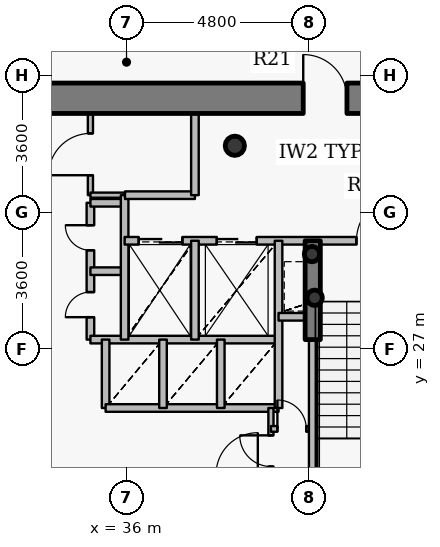
"""IFC4 building model, lengths in metres.
Left out: names, types, materials, properties, quantities, classifications, styles, units other than length and angle.
Written with IfcOpenShell. Run it as: python <this file> out.ifc"""

import sys

from ifc_helpers import new_model, si_unit, direction, frame, frame_2d, origin, origin_2d, place, context, subcontext, project, spatial, rectangle, hollow_circle, extrude, source, transform, mapped, element, fill, save


model = new_model("IFC4")
c1 = context("Model", 3, precision=1e-05, world=origin(), true_north=direction((0.0, 1.0)))
c2 = subcontext(c1, "Body", "Model", "MODEL_VIEW")
j1 = project(units=[si_unit("LENGTHUNIT", "METRE"), si_unit("PLANEANGLEUNIT", "RADIAN")], contexts=[c1])
p1 = place(None, origin())
s1 = spatial("IfcSite", under=j1, at=p1, CompositionType="ELEMENT")
p2 = place(p1, origin())
s2 = spatial("IfcBuilding", under=s1, at=p2, CompositionType="ELEMENT")
p3 = place(p2, frame((0.0, 0.0, 201.15)))
s3 = spatial("IfcBuildingStorey", under=s2, at=p3, CompositionType="ELEMENT", Elevation=201.15)
p4 = place(p3, frame((38.85, 32.35, 0.0), z_axis=(0.0, 0.0, 1.0), x_axis=(1.0, 0.0, 0.0)))
e1 = element("IfcColumn", 1, at=p4, inside=s3, PredefinedType="COLUMN", context=c2, shape_type="SweptSolid", body=[
    extrude(hollow_circle(Radius=0.254, WallThickness=0.02, at=origin_2d()), origin(), (0.0, 0.0, 1.0), 3.75),
])
for number, where, z_axis, x_axis in (
    (2, (40.95, 28.35, 0.0), (0.0, 0.0, 1.0), (1.0, 0.0, 0.0)),
    (3, (40.88, 29.5, 0.0), (0.0, 0.0, 1.0), (1.0, 0.0, 0.0)),
):
    element("IfcColumn", number, at=place(p3, frame(where, z_axis=z_axis, x_axis=x_axis)), inside=s3, PredefinedType="COLUMN", context=c2, shape_type="SweptSolid", body=[
        extrude(hollow_circle(Radius=0.203, WallThickness=0.016, at=origin_2d()), origin(), (0.0, 0.0, 1.0), 3.75),
    ])
p5 = place(p3, frame((27.2, 33.6, 0.0), z_axis=(0.0, 0.0, 1.0), x_axis=(1.0, 0.0, 0.0)))
e4 = element("IfcWall", 4, at=p5, inside=s3, PredefinedType="SHEAR", context=c2, shape_type="SweptSolid", body=[
    extrude(rectangle(XDim=17.6, YDim=0.8, at=frame_2d((8.8, 0.0))), origin(), (0.0, 0.0, 1.0), 2.9),
])
p6 = place(p5, frame((13.45, 0.0, 0.0)))
e5 = element("IfcOpeningElement", 5, at=p6, cuts=e4, PredefinedType="OPENING", context=c2, shape_type="SweptSolid", body=[
    extrude(rectangle(XDim=1.15, YDim=2.15, at=origin_2d()), frame((0.575, 0.41, 1.075), z_axis=(0.0, -1.0, 0.0), x_axis=(1.0, 0.0, 0.0)), (0.0, 0.0, 1.0), 0.82),
])
p7 = place(p3, frame((40.9, 27.25, 0.0), z_axis=(0.0, 0.0, 1.0), x_axis=(0.0, 1.0, 0.0)))
e6 = element("IfcWall", 6, at=p7, inside=s3, PredefinedType="SHEAR", context=c2, shape_type="SweptSolid", body=[
    extrude(rectangle(XDim=2.6, YDim=0.4, at=frame_2d((1.3, 0.0))), origin(), (0.0, 0.0, 1.0), 3.05),
])
p8 = place(p3, frame((35.05, 27.25, 0.0), z_axis=(0.0, 0.0, 1.0), x_axis=(0.0, 1.0, 0.0)))
e7 = element("IfcWall", 7, at=p8, inside=s3, PredefinedType="PARTITIONING", context=c2, shape_type="SweptSolid", body=[
    extrude(rectangle(XDim=3.6, YDim=0.2, at=frame_2d((1.8, 0.0))), origin(), (0.0, 0.0, 1.0), 3.45),
])
p9 = place(p8, frame((0.59, 0.0, 0.0)))
e8 = element("IfcOpeningElement", 8, at=p9, cuts=e7, PredefinedType="OPENING", context=c2, shape_type="SweptSolid", body=[
    extrude(rectangle(XDim=0.66, YDim=2.05, at=origin_2d()), frame((0.33, 0.11, 1.025), z_axis=(0.0, -1.0, 0.0), x_axis=(1.0, 0.0, 0.0)), (0.0, 0.0, 1.0), 0.22),
])
p10 = place(p8, frame((2.35, 0.0, 0.0)))
e9 = element("IfcOpeningElement", 9, at=p10, cuts=e7, PredefinedType="OPENING", context=c2, shape_type="SweptSolid", body=[
    extrude(rectangle(XDim=0.66, YDim=2.05, at=origin_2d()), frame((0.33, 0.11, 1.025), z_axis=(0.0, -1.0, 0.0), x_axis=(1.0, 0.0, 0.0)), (0.0, 0.0, 1.0), 0.22),
])
p11 = place(p3, frame((35.05, 27.25, 0.0), z_axis=(0.0, 0.0, 1.0), x_axis=(1.0, 0.0, 0.0)))
e10 = element("IfcWall", 10, at=p11, inside=s3, PredefinedType="PARTITIONING", context=c2, shape_type="SweptSolid", body=[
    extrude(rectangle(XDim=4.95, YDim=0.2, at=frame_2d((2.475, 0.0))), origin(), (0.0, 0.0, 1.0), 3.035),
])
for number, where, z_axis, x_axis in (
    (11, (35.05, 29.05, 0.0), (0.0, 0.0, 1.0), (1.0, 0.0, 0.0)),
    (12, (35.05, 30.85, 0.0), (0.0, 0.0, 1.0), (1.0, 0.0, 0.0)),
):
    element("IfcWall", number, at=place(p3, frame(where, z_axis=z_axis, x_axis=x_axis)), inside=s3, PredefinedType="PARTITIONING", context=c2, shape_type="SweptSolid", body=[
        extrude(rectangle(XDim=0.9, YDim=0.2, at=frame_2d((0.45, 0.0))), origin(), (0.0, 0.0, 1.0), 3.45),
    ])
p12 = place(p3, frame((35.05, 31.05, 0.0), z_axis=(0.0, 0.0, 1.0), x_axis=(0.0, 1.0, 0.0)))
e13 = element("IfcWall", 13, at=p12, inside=s3, PredefinedType="PARTITIONING", context=c2, shape_type="SweptSolid", body=[
    extrude(rectangle(XDim=2.15, YDim=0.135, at=frame_2d((1.075, 0.0))), origin(), (0.0, 0.0, 1.0), 3.035),
])
p13 = place(p12, frame((0.525, 0.0, 0.0)))
e14 = element("IfcOpeningElement", 14, at=p13, cuts=e13, PredefinedType="OPENING", context=c2, shape_type="SweptSolid", body=[
    extrude(rectangle(XDim=1.1, YDim=2.15, at=origin_2d()), frame((0.55, 0.078, 1.075), z_axis=(0.0, -1.0, 0.0), x_axis=(1.0, 0.0, 0.0)), (0.0, 0.0, 1.0), 0.155),
])
p14 = place(p3, frame((35.05, 31.05, 0.0), z_axis=(0.0, 0.0, 1.0), x_axis=(1.0, 0.0, 0.0)))
e15 = element("IfcWall", 15, at=p14, inside=s3, PredefinedType="PARTITIONING", context=c2, shape_type="SweptSolid", body=[
    extrude(rectangle(XDim=0.9, YDim=0.135, at=frame_2d((0.45, 0.0))), origin(), (0.0, 0.0, 1.0), 3.45),
])
p15 = place(p3, frame((35.45, 25.45, 0.0), z_axis=(0.0, 0.0, 1.0), x_axis=(0.0, 1.0, 0.0)))
e16 = element("IfcWall", 16, at=p15, inside=s3, PredefinedType="PARTITIONING", context=c2, shape_type="SweptSolid", body=[
    extrude(rectangle(XDim=1.8, YDim=0.2, at=frame_2d((0.9, 0.0))), origin(), (0.0, 0.0, 1.0), 3.45),
])
p16 = place(p3, frame((35.45, 25.45, 0.0), z_axis=(0.0, 0.0, 1.0), x_axis=(1.0, 0.0, 0.0)))
e17 = element("IfcWall", 17, at=p16, inside=s3, PredefinedType="PARTITIONING", context=c2, shape_type="SweptSolid", body=[
    extrude(rectangle(XDim=4.55, YDim=0.2, at=frame_2d((2.275, 0.0))), origin(), (0.0, 0.0, 1.0), 3.035),
])
p17 = place(p3, frame((35.95, 27.25, 0.0), z_axis=(0.0, 0.0, 1.0), x_axis=(0.0, 1.0, 0.0)))
e18 = element("IfcWall", 18, at=p17, inside=s3, PredefinedType="PARTITIONING", context=c2, shape_type="SweptSolid", body=[
    extrude(rectangle(XDim=3.8, YDim=0.2, at=frame_2d((1.9, 0.0))), origin(), (0.0, 0.0, 1.0), 3.45),
])
p18 = place(p3, frame((35.95, 29.85, 0.0), z_axis=(0.0, 0.0, 1.0), x_axis=(1.0, 0.0, 0.0)))
e19 = element("IfcWall", 19, at=p18, inside=s3, PredefinedType="PARTITIONING", context=c2, shape_type="SweptSolid", body=[
    extrude(rectangle(XDim=8.49, YDim=0.2, at=frame_2d((4.245, 0.0))), origin(), (0.0, 0.0, 1.0), 3.035),
])
p19 = place(p18, frame((6.1, 0.0, 0.0)))
e20 = element("IfcOpeningElement", 20, at=p19, cuts=e19, PredefinedType="OPENING", context=c2, shape_type="SweptSolid", body=[
    extrude(rectangle(XDim=1.2, YDim=2.15, at=origin_2d()), frame((0.6, 0.11, 1.075), z_axis=(0.0, -1.0, 0.0), x_axis=(1.0, 0.0, 0.0)), (0.0, 0.0, 1.0), 0.22),
])
p20 = place(p18, frame((0.37, 0.0, 0.0)))
e21 = element("IfcOpeningElement", 21, at=p20, cuts=e19, PredefinedType="OPENING", context=c2, shape_type="SweptSolid", body=[
    extrude(rectangle(XDim=1.15, YDim=2.15, at=origin_2d()), frame((0.575, 0.11, 1.075), z_axis=(0.0, -1.0, 0.0), x_axis=(1.0, 0.0, 0.0)), (0.0, 0.0, 1.0), 0.22),
])
p21 = place(p18, frame((2.425, 0.0, 0.0)))
e22 = element("IfcOpeningElement", 22, at=p21, cuts=e19, PredefinedType="OPENING", context=c2, shape_type="SweptSolid", body=[
    extrude(rectangle(XDim=1.05, YDim=2.15, at=origin_2d()), frame((0.525, 0.11, 1.075), z_axis=(0.0, -1.0, 0.0), x_axis=(1.0, 0.0, 0.0)), (0.0, 0.0, 1.0), 0.22),
])
p22 = place(p3, frame((35.96, 31.05, 0.0), z_axis=(0.0, 0.0, 1.0), x_axis=(1.0, 0.0, 0.0)))
e23 = element("IfcWall", 23, at=p22, inside=s3, PredefinedType="PARTITIONING", context=c2, shape_type="SweptSolid", body=[
    extrude(rectangle(XDim=1.84, YDim=0.2, at=frame_2d((0.92, 0.0))), origin(), (0.0, 0.0, 1.0), 3.45),
])
p23 = place(p3, frame((36.96, 25.45, 0.0), z_axis=(0.0, 0.0, 1.0), x_axis=(0.0, 1.0, 0.0)))
e24 = element("IfcWall", 24, at=p23, inside=s3, PredefinedType="PARTITIONING", context=c2, shape_type="SweptSolid", body=[
    extrude(rectangle(XDim=1.8, YDim=0.2, at=frame_2d((0.9, 0.0))), origin(), (0.0, 0.0, 1.0), 3.45),
])
p24 = place(p3, frame((37.8, 27.25, 0.0), z_axis=(0.0, 0.0, 1.0), x_axis=(0.0, 1.0, 0.0)))
e25 = element("IfcWall", 25, at=p24, inside=s3, PredefinedType="PARTITIONING", context=c2, shape_type="SweptSolid", body=[
    extrude(rectangle(XDim=2.6, YDim=0.2, at=frame_2d((1.3, 0.0))), origin(), (0.0, 0.0, 1.0), 3.45),
])
p25 = place(p3, frame((37.8, 31.05, 0.0), z_axis=(0.0, 0.0, 1.0), x_axis=(0.0, 1.0, 0.0)))
e26 = element("IfcWall", 26, at=p25, inside=s3, PredefinedType="PARTITIONING", context=c2, shape_type="SweptSolid", body=[
    extrude(rectangle(XDim=2.15, YDim=0.2, at=frame_2d((1.075, 0.0))), origin(), (0.0, 0.0, 1.0), 3.035),
])
p26 = place(p3, frame((38.48, 25.45, 0.0), z_axis=(0.0, 0.0, 1.0), x_axis=(0.0, 1.0, 0.0)))
e27 = element("IfcWall", 27, at=p26, inside=s3, PredefinedType="PARTITIONING", context=c2, shape_type="SweptSolid", body=[
    extrude(rectangle(XDim=1.8, YDim=0.2, at=frame_2d((0.9, 0.0))), origin(), (0.0, 0.0, 1.0), 3.45),
])
p27 = place(p3, frame((39.8, 23.7, 0.0), z_axis=(0.0, 0.0, 1.0), x_axis=(0.0, 1.0, 0.0)))
e28 = element("IfcWall", 28, at=p27, inside=s3, PredefinedType="PARTITIONING", context=c2, shape_type="SweptSolid", body=[
    extrude(rectangle(XDim=1.75, YDim=0.135, at=frame_2d((0.875, 0.0))), origin(), (0.0, 0.0, 1.0), 3.45),
])
p28 = place(p27, frame((0.21, 0.0, 0.0)))
e29 = element("IfcOpeningElement", 29, at=p28, cuts=e28, PredefinedType="OPENING", context=c2, shape_type="SweptSolid", body=[
    extrude(rectangle(XDim=0.82, YDim=2.1, at=origin_2d()), frame((0.41, 0.078, 1.05), z_axis=(0.0, -1.0, 0.0), x_axis=(1.0, 0.0, 0.0)), (0.0, 0.0, 1.0), 0.155),
])
p29 = place(p3, frame((39.8, 24.9, 0.0), z_axis=(0.0, 0.0, 1.0), x_axis=(1.0, 0.0, 0.0)))
e30 = element("IfcWall", 30, at=p29, inside=s3, PredefinedType="PARTITIONING", context=c2, shape_type="SweptSolid", body=[
    extrude(rectangle(XDim=1.1, YDim=0.15, at=frame_2d((0.55, 0.0))), origin(), (0.0, 0.0, 1.0), 3.45),
])
p30 = place(p29, frame((0.17, 0.0, 0.0)))
e31 = element("IfcOpeningElement", 31, at=p30, cuts=e30, PredefinedType="OPENING", context=c2, shape_type="SweptSolid", body=[
    extrude(rectangle(XDim=0.76, YDim=2.1, at=origin_2d()), frame((0.38, 0.085, 1.05), z_axis=(0.0, -1.0, 0.0), x_axis=(1.0, 0.0, 0.0)), (0.0, 0.0, 1.0), 0.17),
])
p31 = place(p3, frame((40.0, 25.45, 0.0), z_axis=(0.0, 0.0, 1.0), x_axis=(0.0, 1.0, 0.0)))
e32 = element("IfcWall", 32, at=p31, inside=s3, PredefinedType="PARTITIONING", context=c2, shape_type="SweptSolid", body=[
    extrude(rectangle(XDim=4.4, YDim=0.2, at=frame_2d((2.2, 0.0))), origin(), (0.0, 0.0, 1.0), 3.45),
])
p32 = place(p3, frame((40.0, 27.85, 0.0), z_axis=(0.0, 0.0, 1.0), x_axis=(1.0, 0.0, 0.0)))
e33 = element("IfcWall", 33, at=p32, inside=s3, PredefinedType="PARTITIONING", context=c2, shape_type="SweptSolid", body=[
    extrude(rectangle(XDim=0.9, YDim=0.2, at=frame_2d((0.45, 0.0))), origin(), (0.0, 0.0, 1.0), 3.45),
])
p33 = place(p3, frame((40.9, 21.33, 0.0), z_axis=(0.0, 0.0, 1.0), x_axis=(0.0, 1.0, 0.0)))
e34 = element("IfcWall", 34, at=p33, inside=s3, PredefinedType="PARTITIONING", context=c2, shape_type="SweptSolid", body=[
    extrude(rectangle(XDim=5.91, YDim=0.2, at=frame_2d((2.955, 0.0))), origin(), (0.0, 0.0, 1.0), 2.985),
])
m1 = source(origin(), c2, "Body", "SweptSolid", [
    extrude(rectangle(XDim=1.15, YDim=2.15, at=origin_2d()), frame((0.575, 0.025, 1.075), z_axis=(0.0, -1.0, 0.0), x_axis=(1.0, 0.0, 0.0)), (0.0, 0.0, 1.0), 0.05),
])
p34 = place(p6, origin())
e35 = element("IfcDoor", 35, at=p34, inside=s3, OperationType="SINGLE_SWING_LEFT", PredefinedType="DOOR", context=c2, shape_type="MappedRepresentation", body=[
    mapped(m1, transform((0.0, 0.0, 0.0), x_axis=(1.0, 0.0, 0.0), y_axis=(0.0, 1.0, 0.0), z_axis=(0.0, 0.0, 1.0), scale=1.0)),
])
fill(e5, e35)
m2 = source(origin(), c2, "Body", "SweptSolid", [
    extrude(rectangle(XDim=1.2, YDim=2.15, at=origin_2d()), frame((0.6, 0.025, 1.075), z_axis=(0.0, -1.0, 0.0), x_axis=(1.0, 0.0, 0.0)), (0.0, 0.0, 1.0), 0.05),
])
p35 = place(p19, origin())
e36 = element("IfcDoor", 36, at=p35, inside=s3, OperationType="SINGLE_SWING_RIGHT", PredefinedType="DOOR", context=c2, shape_type="MappedRepresentation", body=[
    mapped(m2, transform((0.0, 0.0, 0.0), x_axis=(1.0, 0.0, 0.0), y_axis=(0.0, 1.0, 0.0), z_axis=(0.0, 0.0, 1.0), scale=1.0)),
])
fill(e20, e36)
m3 = source(origin(), c2, "Body", "SweptSolid", [
    extrude(rectangle(XDim=1.15, YDim=2.15, at=origin_2d()), frame((0.575, 0.025, 1.075), z_axis=(0.0, -1.0, 0.0), x_axis=(1.0, 0.0, 0.0)), (0.0, 0.0, 1.0), 0.05),
])
p36 = place(p20, origin())
e37 = element("IfcDoor", 37, at=p36, inside=s3, OperationType="DOUBLE_DOOR_SLIDING", PredefinedType="USERDEFINED", context=c2, shape_type="MappedRepresentation", body=[
    mapped(m3, transform((0.0, 0.0, 0.0), x_axis=(1.0, 0.0, 0.0), y_axis=(0.0, 1.0, 0.0), z_axis=(0.0, 0.0, 1.0), scale=1.0)),
])
fill(e21, e37)
m4 = source(origin(), c2, "Body", "SweptSolid", [
    extrude(rectangle(XDim=1.05, YDim=2.15, at=origin_2d()), frame((0.525, 0.025, 1.075), z_axis=(0.0, -1.0, 0.0), x_axis=(1.0, 0.0, 0.0)), (0.0, 0.0, 1.0), 0.05),
])
p37 = place(p21, origin())
e38 = element("IfcDoor", 38, at=p37, inside=s3, OperationType="DOUBLE_DOOR_SLIDING", PredefinedType="USERDEFINED", context=c2, shape_type="MappedRepresentation", body=[
    mapped(m4, transform((0.0, 0.0, 0.0), x_axis=(1.0, 0.0, 0.0), y_axis=(0.0, 1.0, 0.0), z_axis=(0.0, 0.0, 1.0), scale=1.0)),
])
fill(e22, e38)
m5 = source(origin(), c2, "Body", "SweptSolid", [
    extrude(rectangle(XDim=0.66, YDim=2.05, at=origin_2d()), frame((0.33, 0.025, 1.025), z_axis=(0.0, -1.0, 0.0), x_axis=(1.0, 0.0, 0.0)), (0.0, 0.0, 1.0), 0.05),
])
p38 = place(p9, origin())
e39 = element("IfcDoor", 39, at=p38, inside=s3, OperationType="SINGLE_SWING_LEFT", PredefinedType="USERDEFINED", context=c2, shape_type="MappedRepresentation", body=[
    mapped(m5, transform((0.0, 0.0, 0.0), x_axis=(1.0, 0.0, 0.0), y_axis=(0.0, 1.0, 0.0), z_axis=(0.0, 0.0, 1.0), scale=1.0)),
])
fill(e8, e39)
p39 = place(p10, origin())
e40 = element("IfcDoor", 40, at=p39, inside=s3, OperationType="SINGLE_SWING_RIGHT", PredefinedType="USERDEFINED", context=c2, shape_type="MappedRepresentation", body=[
    mapped(m5, transform((0.0, 0.0, 0.0), x_axis=(1.0, 0.0, 0.0), y_axis=(0.0, 1.0, 0.0), z_axis=(0.0, 0.0, 1.0), scale=1.0)),
])
fill(e9, e40)
m6 = source(origin(), c2, "Body", "SweptSolid", [
    extrude(rectangle(XDim=1.1, YDim=2.15, at=origin_2d()), frame((0.55, 0.025, 1.075), z_axis=(0.0, -1.0, 0.0), x_axis=(1.0, 0.0, 0.0)), (0.0, 0.0, 1.0), 0.05),
])
p40 = place(p13, origin())
e41 = element("IfcDoor", 41, at=p40, inside=s3, OperationType="SINGLE_SWING_LEFT", PredefinedType="DOOR", context=c2, shape_type="MappedRepresentation", body=[
    mapped(m6, transform((0.0, 0.0, 0.0), x_axis=(1.0, 0.0, 0.0), y_axis=(0.0, 1.0, 0.0), z_axis=(0.0, 0.0, 1.0), scale=1.0)),
])
fill(e14, e41)
m7 = source(origin(), c2, "Body", "SweptSolid", [
    extrude(rectangle(XDim=0.82, YDim=2.1, at=origin_2d()), frame((0.41, 0.025, 1.05), z_axis=(0.0, -1.0, 0.0), x_axis=(1.0, 0.0, 0.0)), (0.0, 0.0, 1.0), 0.05),
])
p41 = place(p28, origin())
e42 = element("IfcDoor", 42, at=p41, inside=s3, OperationType="SINGLE_SWING_RIGHT", PredefinedType="DOOR", context=c2, shape_type="MappedRepresentation", body=[
    mapped(m7, transform((0.0, 0.0, 0.0), x_axis=(1.0, 0.0, 0.0), y_axis=(0.0, 1.0, 0.0), z_axis=(0.0, 0.0, 1.0), scale=1.0)),
])
fill(e29, e42)
m8 = source(origin(), c2, "Body", "SweptSolid", [
    extrude(rectangle(XDim=0.76, YDim=2.1, at=origin_2d()), frame((0.38, 0.025, 1.05), z_axis=(0.0, -1.0, 0.0), x_axis=(1.0, 0.0, 0.0)), (0.0, 0.0, 1.0), 0.05),
])
p42 = place(p30, origin())
e43 = element("IfcDoor", 43, at=p42, inside=s3, OperationType="SINGLE_SWING_LEFT", PredefinedType="DOOR", context=c2, shape_type="MappedRepresentation", body=[
    mapped(m8, transform((0.0, 0.0, 0.0), x_axis=(1.0, 0.0, 0.0), y_axis=(0.0, 1.0, 0.0), z_axis=(0.0, 0.0, 1.0), scale=1.0)),
])
fill(e31, e43)
save(model, sys.argv[1])
